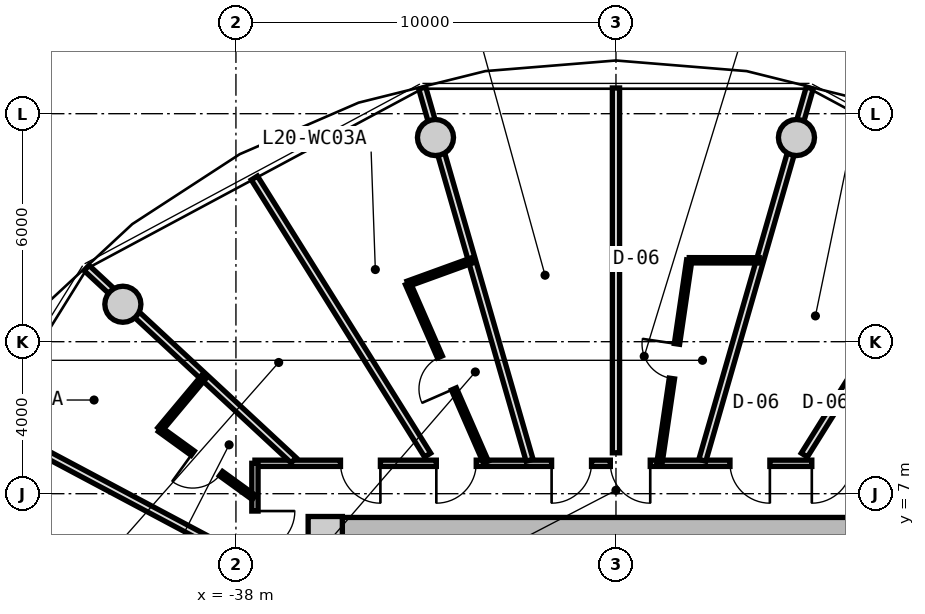
"""IFC4 building model, lengths in metres.
Left out: names, types, materials, properties, quantities, classifications, styles, units other than length and angle.
Written with IfcOpenShell. Run it as: python <this file> out.ifc"""

import sys

from ifc_helpers import new_model, si_unit, direction, frame, frame_2d, origin, origin_2d, place, context, subcontext, project, spatial, rectangle, circle, extrude, source, transform, mapped, element, fill, save


model = new_model("IFC4")
c1 = context("Model", 3, precision=1e-05, world=origin(), true_north=direction((0.0, 1.0)))
c2 = subcontext(c1, "Body", "Model", "MODEL_VIEW")
j1 = project(units=[si_unit("LENGTHUNIT", "METRE"), si_unit("PLANEANGLEUNIT", "RADIAN")], contexts=[c1])
p1 = place(None, origin())
s1 = spatial("IfcSite", under=j1, at=p1, CompositionType="ELEMENT")
p2 = place(p1, origin())
s2 = spatial("IfcBuilding", under=s1, at=p2, CompositionType="ELEMENT")
p3 = place(p2, frame((0.0, 0.0, 67.35)))
s3 = spatial("IfcBuildingStorey", under=s2, at=p3, CompositionType="ELEMENT", Elevation=67.35)
m1 = source(origin(), c2, "Body", "SweptSolid", [
    extrude(rectangle(XDim=0.9, YDim=0.9, at=origin_2d()), origin(), (0.0, 0.0, 1.0), 3.05),
])
p4 = place(p3, frame((-35.65, 5.95, 0.0), z_axis=(0.0, 0.0, 1.0), x_axis=(1.0, 0.0, 0.0)))
e1 = element("IfcColumn", 1, at=p4, inside=s3, PredefinedType="COLUMN", context=c2, shape_type="MappedRepresentation", body=[
    mapped(m1, transform((0.0, 0.0, 0.0), x_axis=(1.0, 0.0, 0.0), y_axis=(0.0, 1.0, 0.0), z_axis=(0.0, 0.0, 1.0), scale=1.0)),
])
m2 = source(origin(), c2, "Body", "SweptSolid", [
    extrude(rectangle(XDim=14.4, YDim=0.85, at=frame_2d((7.2, 0.0))), origin(), (0.0, 0.0, 1.0), 2.79),
])
p5 = place(p3, frame((-35.2, 5.95, 0.0), z_axis=(0.0, 0.0, 1.0), x_axis=(1.0, 0.0, 0.0)))
e2 = element("IfcWall", 2, at=p5, inside=s3, PredefinedType="SHEAR", context=c2, shape_type="MappedRepresentation", body=[
    mapped(m2, transform((0.0, 0.0, 0.0), x_axis=(1.0, 0.0, 0.0), y_axis=(0.0, 1.0, 0.0), z_axis=(0.0, 0.0, 1.0), scale=1.0)),
])
m3 = source(origin(), c2, "Body", "SweptSolid", [
    extrude(circle(Radius=0.475, at=origin_2d()), origin(), (0.0, 0.0, 1.0), 3.05),
])
for number, where, z_axis, x_axis in (
    (3, (-23.251, 16.373, 0.0), (0.0, 0.0, 1.0), (1.0, 0.0, 0.0)),
    (4, (-32.749, 16.373, 0.0), (0.0, 0.0, 1.0), (1.0, 0.0, 0.0)),
    (5, (-40.975, 11.985, 0.0), (0.0, 0.0, 1.0), (1.0, 0.0, 0.0)),
):
    element("IfcColumn", number, at=place(p3, frame(where, z_axis=z_axis, x_axis=x_axis)), inside=s3, PredefinedType="COLUMN", context=c2, shape_type="MappedRepresentation", body=[
        mapped(m3, transform((0.0, 0.0, 0.0), x_axis=(1.0, 0.0, 0.0), y_axis=(0.0, 1.0, 0.0), z_axis=(0.0, 0.0, 1.0), scale=1.0)),
    ])
m4 = source(origin(), c2, "Body", "SweptSolid", [
    extrude(rectangle(XDim=19.0, YDim=0.165, at=frame_2d((9.5, 0.0))), origin(), (0.0, 0.0, 1.0), 2.775),
])
p6 = place(p3, frame((-37.5, 7.8, 0.0), z_axis=(0.0, 0.0, 1.0), x_axis=(1.0, 0.0, 0.0)))
e6 = element("IfcWall", 6, at=p6, inside=s3, PredefinedType="PARTITIONING", context=c2, shape_type="MappedRepresentation", body=[
    mapped(m4, transform((0.0, 0.0, 0.0), x_axis=(1.0, 0.0, 0.0), y_axis=(0.0, 1.0, 0.0), z_axis=(0.0, 0.0, 1.0), scale=1.0)),
])
p7 = place(p6, frame((14.653, 0.0, 0.0)))
e7 = element("IfcOpeningElement", 7, at=p7, cuts=e6, PredefinedType="OPENING", context=c2, shape_type="SweptSolid", body=[
    extrude(rectangle(XDim=1.05, YDim=2.15, at=frame_2d((0.525, 1.075))), frame((0.0, 0.093, 0.0), z_axis=(0.0, -1.0, 0.0), x_axis=(1.0, 0.0, 0.0)), (0.0, 0.0, 1.0), 0.185),
])
p8 = place(p6, frame((12.5, 0.0, 0.0)))
e8 = element("IfcOpeningElement", 8, at=p8, cuts=e6, PredefinedType="OPENING", context=c2, shape_type="SweptSolid", body=[
    extrude(rectangle(XDim=1.05, YDim=2.15, at=frame_2d((0.525, 1.075))), frame((0.0, 0.093, 0.0), z_axis=(0.0, -1.0, 0.0), x_axis=(1.0, 0.0, 0.0)), (0.0, 0.0, 1.0), 0.185),
])
p9 = place(p6, frame((9.352, 0.0, 0.0)))
e9 = element("IfcOpeningElement", 9, at=p9, cuts=e6, PredefinedType="OPENING", context=c2, shape_type="SweptSolid", body=[
    extrude(rectangle(XDim=1.05, YDim=2.15, at=frame_2d((0.525, 1.075))), frame((0.0, 0.093, 0.0), z_axis=(0.0, -1.0, 0.0), x_axis=(1.0, 0.0, 0.0)), (0.0, 0.0, 1.0), 0.185),
])
p10 = place(p6, frame((7.806, 0.0, 0.0)))
e10 = element("IfcOpeningElement", 10, at=p10, cuts=e6, PredefinedType="OPENING", context=c2, shape_type="SweptSolid", body=[
    extrude(rectangle(XDim=1.05, YDim=2.15, at=frame_2d((0.525, 1.075))), frame((0.0, 0.093, 0.0), z_axis=(0.0, -1.0, 0.0), x_axis=(1.0, 0.0, 0.0)), (0.0, 0.0, 1.0), 0.185),
])
p11 = place(p6, frame((4.773, 0.0, 0.0)))
e11 = element("IfcOpeningElement", 11, at=p11, cuts=e6, PredefinedType="OPENING", context=c2, shape_type="SweptSolid", body=[
    extrude(rectangle(XDim=1.05, YDim=2.15, at=frame_2d((0.525, 1.075))), frame((0.0, 0.093, 0.0), z_axis=(0.0, -1.0, 0.0), x_axis=(1.0, 0.0, 0.0)), (0.0, 0.0, 1.0), 0.185),
])
p12 = place(p6, frame((2.251, 0.0, 0.0)))
e12 = element("IfcOpeningElement", 12, at=p12, cuts=e6, PredefinedType="OPENING", context=c2, shape_type="SweptSolid", body=[
    extrude(rectangle(XDim=1.05, YDim=2.15, at=frame_2d((0.525, 1.075))), frame((0.0, 0.093, 0.0), z_axis=(0.0, -1.0, 0.0), x_axis=(1.0, 0.0, 0.0)), (0.0, 0.0, 1.0), 0.185),
])
m5 = source(origin(), c2, "Body", "SweptSolid", [
    extrude(rectangle(XDim=15.6, YDim=0.165, at=frame_2d((7.8, 0.0))), origin(), (0.0, 0.0, 1.0), 2.775),
])
p13 = place(p3, frame((-37.5, -7.8, 0.0), z_axis=(0.0, 0.0, 1.0), x_axis=(0.0, 1.0, 0.0)))
e13 = element("IfcWall", 13, at=p13, inside=s3, PredefinedType="PARTITIONING", context=c2, shape_type="MappedRepresentation", body=[
    mapped(m5, transform((0.0, 0.0, 0.0), x_axis=(1.0, 0.0, 0.0), y_axis=(0.0, 1.0, 0.0), z_axis=(0.0, 0.0, 1.0), scale=1.0)),
])
p14 = place(p13, frame((3.489, 0.0, 0.0)))
e14 = element("IfcOpeningElement", 14, at=p14, cuts=e13, PredefinedType="OPENING", context=c2, shape_type="SweptSolid", body=[
    extrude(rectangle(XDim=1.05, YDim=2.15, at=frame_2d((0.525, 1.075))), frame((0.0, 0.093, 0.0), z_axis=(0.0, -1.0, 0.0), x_axis=(1.0, 0.0, 0.0)), (0.0, 0.0, 1.0), 0.185),
])
p15 = place(p13, frame((0.882, 0.0, 0.0)))
e15 = element("IfcOpeningElement", 15, at=p15, cuts=e13, PredefinedType="OPENING", context=c2, shape_type="SweptSolid", body=[
    extrude(rectangle(XDim=1.05, YDim=2.15, at=frame_2d((0.525, 1.075))), frame((0.0, 0.093, 0.0), z_axis=(0.0, -1.0, 0.0), x_axis=(1.0, 0.0, 0.0)), (0.0, 0.0, 1.0), 0.185),
])
p16 = place(p13, frame((13.293, 0.0, 0.0)))
e16 = element("IfcOpeningElement", 16, at=p16, cuts=e13, PredefinedType="OPENING", context=c2, shape_type="SweptSolid", body=[
    extrude(rectangle(XDim=1.05, YDim=2.15, at=frame_2d((0.525, 1.075))), frame((0.0, 0.093, 0.0), z_axis=(0.0, -1.0, 0.0), x_axis=(1.0, 0.0, 0.0)), (0.0, 0.0, 1.0), 0.185),
])
p17 = place(p13, frame((11.018, 0.0, 0.0)))
e17 = element("IfcOpeningElement", 17, at=p17, cuts=e13, PredefinedType="OPENING", context=c2, shape_type="SweptSolid", body=[
    extrude(rectangle(XDim=1.05, YDim=2.15, at=frame_2d((0.525, 1.075))), frame((0.0, 0.093, 0.0), z_axis=(0.0, -1.0, 0.0), x_axis=(1.0, 0.0, 0.0)), (0.0, 0.0, 1.0), 0.185),
])
p18 = place(p13, frame((8.467, 0.0, 0.0)))
e18 = element("IfcOpeningElement", 18, at=p18, cuts=e13, PredefinedType="OPENING", context=c2, shape_type="SweptSolid", body=[
    extrude(rectangle(XDim=1.05, YDim=2.15, at=frame_2d((0.525, 1.075))), frame((0.0, 0.093, 0.0), z_axis=(0.0, -1.0, 0.0), x_axis=(1.0, 0.0, 0.0)), (0.0, 0.0, 1.0), 0.185),
])
p19 = place(p13, frame((6.035, 0.0, 0.0)))
e19 = element("IfcOpeningElement", 19, at=p19, cuts=e13, PredefinedType="OPENING", context=c2, shape_type="SweptSolid", body=[
    extrude(rectangle(XDim=1.05, YDim=2.15, at=frame_2d((0.525, 1.075))), frame((0.0, 0.093, 0.0), z_axis=(0.0, -1.0, 0.0), x_axis=(1.0, 0.0, 0.0)), (0.0, 0.0, 1.0), 0.185),
])
m6 = source(origin(), c2, "Body", "SweptSolid", [
    extrude(rectangle(XDim=10.196, YDim=0.19, at=frame_2d((5.098, 0.0))), origin(), (0.0, 0.0, 1.0), 2.225),
])
p20 = place(p3, frame((-25.727, 7.88, 0.0), z_axis=(0.0, 0.0, 1.0), x_axis=(0.277136420347, 0.960830580549, 0.0)))
e20 = element("IfcWall", 20, at=p20, inside=s3, PredefinedType="PARTITIONING", context=c2, shape_type="MappedRepresentation", body=[
    mapped(m6, transform((0.0, 0.0, 0.0), x_axis=(1.0, 0.0, 0.0), y_axis=(0.0, 1.0, 0.0), z_axis=(0.0, 0.0, 1.0), scale=1.0)),
])
m7 = source(origin(), c2, "Body", "SweptSolid", [
    extrude(rectangle(XDim=8.598, YDim=0.19, at=frame_2d((4.299, 0.0))), origin(), (0.0, 0.0, 1.0), 2.775),
])
p21 = place(p3, frame((-23.043, 8.017, 0.0), z_axis=(0.0, 0.0, 1.0), x_axis=(0.530039776395, 0.847972779893, 0.0)))
e21 = element("IfcWall", 21, at=p21, inside=s3, PredefinedType="PARTITIONING", context=c2, shape_type="MappedRepresentation", body=[
    mapped(m7, transform((0.0, 0.0, 0.0), x_axis=(1.0, 0.0, 0.0), y_axis=(0.0, 1.0, 0.0), z_axis=(0.0, 0.0, 1.0), scale=1.0)),
])
p22 = place(p3, frame((-30.273, 7.88, 0.0), z_axis=(0.0, 0.0, 1.0), x_axis=(-0.277136420347, 0.960830580549, 0.0)))
e22 = element("IfcWall", 22, at=p22, inside=s3, PredefinedType="PARTITIONING", context=c2, shape_type="MappedRepresentation", body=[
    mapped(m6, transform((0.0, 0.0, 0.0), x_axis=(1.0, 0.0, 0.0), y_axis=(0.0, 1.0, 0.0), z_axis=(0.0, 0.0, 1.0), scale=1.0)),
])
m8 = source(origin(), c2, "Body", "SweptSolid", [
    extrude(rectangle(XDim=9.601, YDim=0.19, at=frame_2d((4.8, 0.0))), origin(), (0.0, 0.0, 1.0), 2.775),
])
p23 = place(p3, frame((-28.0, 8.076, 0.0), z_axis=(0.0, 0.0, 1.0), x_axis=(0.0, 1.0, 0.0)))
e23 = element("IfcWall", 23, at=p23, inside=s3, PredefinedType="PARTITIONING", context=c2, shape_type="MappedRepresentation", body=[
    mapped(m8, transform((0.0, 0.0, 0.0), x_axis=(1.0, 0.0, 0.0), y_axis=(0.0, 1.0, 0.0), z_axis=(0.0, 0.0, 1.0), scale=1.0)),
])
m9 = source(origin(), c2, "Body", "SweptSolid", [
    extrude(rectangle(XDim=5.37, YDim=0.14, at=frame_2d((2.685, 0.0))), origin(), (0.0, 0.0, 1.0), 2.775),
])
p24 = place(p3, frame((-26.851, 7.83, 0.0), z_axis=(0.0, 0.0, 1.0), x_axis=(0.145131397853, 0.989412389935, 0.0)))
e24 = element("IfcWall", 24, at=p24, inside=s3, PredefinedType="PARTITIONING", context=c2, shape_type="MappedRepresentation", body=[
    mapped(m9, transform((0.0, 0.0, 0.0), x_axis=(1.0, 0.0, 0.0), y_axis=(0.0, 1.0, 0.0), z_axis=(0.0, 0.0, 1.0), scale=1.0)),
])
p25 = place(p24, frame((2.225, 0.0, 0.0)))
e25 = element("IfcOpeningElement", 25, at=p25, cuts=e24, PredefinedType="OPENING", context=c2, shape_type="SweptSolid", body=[
    extrude(rectangle(XDim=0.92, YDim=2.1, at=frame_2d((0.46, 1.05))), frame((0.0, 0.08, 0.0), z_axis=(0.0, -1.0, 0.0), x_axis=(1.0, 0.0, 0.0)), (0.0, 0.0, 1.0), 0.16),
])
m10 = source(origin(), c2, "Body", "SweptSolid", [
    extrude(rectangle(XDim=1.843, YDim=0.14, at=frame_2d((0.921, 0.0))), origin(), (0.0, 0.0, 1.0), 2.775),
])
p26 = place(p3, frame((-26.072, 13.143, 0.0), z_axis=(0.0, 0.0, 1.0), x_axis=(0.999998937801, -0.001457531246, 0.0)))
e26 = element("IfcWall", 26, at=p26, inside=s3, PredefinedType="PARTITIONING", context=c2, shape_type="MappedRepresentation", body=[
    mapped(m10, transform((0.0, 0.0, 0.0), x_axis=(1.0, 0.0, 0.0), y_axis=(0.0, 1.0, 0.0), z_axis=(0.0, 0.0, 1.0), scale=1.0)),
])
m11 = source(origin(), c2, "Body", "SweptSolid", [
    extrude(rectangle(XDim=7.435, YDim=0.19, at=frame_2d((3.717, 0.0))), origin(), (0.0, 0.0, 1.0), 2.225),
])
p27 = place(p3, frame((-36.483, 7.88, 0.0), z_axis=(0.0, 0.0, 1.0), x_axis=(-0.732651956848, 0.680603489652, 0.0)))
e27 = element("IfcWall", 27, at=p27, inside=s3, PredefinedType="PARTITIONING", context=c2, shape_type="MappedRepresentation", body=[
    mapped(m11, transform((0.0, 0.0, 0.0), x_axis=(1.0, 0.0, 0.0), y_axis=(0.0, 1.0, 0.0), z_axis=(0.0, 0.0, 1.0), scale=1.0)),
])
p28 = place(p3, frame((-32.957, 8.017, 0.0), z_axis=(0.0, 0.0, 1.0), x_axis=(-0.530039776395, 0.847972779893, 0.0)))
e28 = element("IfcWall", 28, at=p28, inside=s3, PredefinedType="PARTITIONING", context=c2, shape_type="MappedRepresentation", body=[
    mapped(m7, transform((0.0, 0.0, 0.0), x_axis=(1.0, 0.0, 0.0), y_axis=(0.0, 1.0, 0.0), z_axis=(0.0, 0.0, 1.0), scale=1.0)),
])
m12 = source(origin(), c2, "Body", "SweptSolid", [
    extrude(rectangle(XDim=5.126, YDim=0.14, at=frame_2d((2.563, 0.0))), origin(), (0.0, 0.0, 1.0), 2.775),
])
p29 = place(p3, frame((-31.422, 7.83, 0.0), z_axis=(0.0, 0.0, 1.0), x_axis=(-0.400473994842, 0.916308124735, 0.0)))
e29 = element("IfcWall", 29, at=p29, inside=s3, PredefinedType="PARTITIONING", context=c2, shape_type="MappedRepresentation", body=[
    mapped(m12, transform((0.0, 0.0, 0.0), x_axis=(1.0, 0.0, 0.0), y_axis=(0.0, 1.0, 0.0), z_axis=(0.0, 0.0, 1.0), scale=1.0)),
])
p30 = place(p29, frame((2.103, 0.0, 0.0)))
e30 = element("IfcOpeningElement", 30, at=p30, cuts=e29, PredefinedType="OPENING", context=c2, shape_type="SweptSolid", body=[
    extrude(rectangle(XDim=0.92, YDim=2.1, at=frame_2d((0.46, 1.05))), frame((0.0, 0.08, 0.0), z_axis=(0.0, -1.0, 0.0), x_axis=(1.0, 0.0, 0.0)), (0.0, 0.0, 1.0), 0.16),
])
m13 = source(origin(), c2, "Body", "SweptSolid", [
    extrude(rectangle(XDim=1.811, YDim=0.14, at=frame_2d((0.906, 0.0))), origin(), (0.0, 0.0, 1.0), 2.775),
])
p31 = place(p3, frame((-33.475, 12.527, 0.0), z_axis=(0.0, 0.0, 1.0), x_axis=(0.940009682452, 0.341147764021, 0.0)))
e31 = element("IfcWall", 31, at=p31, inside=s3, PredefinedType="PARTITIONING", context=c2, shape_type="MappedRepresentation", body=[
    mapped(m13, transform((0.0, 0.0, 0.0), x_axis=(1.0, 0.0, 0.0), y_axis=(0.0, 1.0, 0.0), z_axis=(0.0, 0.0, 1.0), scale=1.0)),
])
m14 = source(origin(), c2, "Body", "SweptSolid", [
    extrude(rectangle(XDim=7.677, YDim=0.19, at=frame_2d((3.838, 0.0))), origin(), (0.0, 0.0, 1.0), 2.775),
])
p32 = place(p3, frame((-37.703, 5.231, 0.0), z_axis=(0.0, 0.0, 1.0), x_axis=(-0.882725057546, 0.469889851753, 0.0)))
e32 = element("IfcWall", 32, at=p32, inside=s3, PredefinedType="PARTITIONING", context=c2, shape_type="MappedRepresentation", body=[
    mapped(m14, transform((0.0, 0.0, 0.0), x_axis=(1.0, 0.0, 0.0), y_axis=(0.0, 1.0, 0.0), z_axis=(0.0, 0.0, 1.0), scale=1.0)),
])
m15 = source(origin(), c2, "Body", "SweptSolid", [
    extrude(rectangle(XDim=3.051, YDim=0.14, at=frame_2d((1.525, 0.0))), origin(), (0.0, 0.0, 1.0), 2.775),
])
p33 = place(p3, frame((-37.53, 6.903, 0.0), z_axis=(0.0, 0.0, 1.0), x_axis=(-0.809849031404, 0.586638343729, 0.0)))
e33 = element("IfcWall", 33, at=p33, inside=s3, PredefinedType="PARTITIONING", context=c2, shape_type="MappedRepresentation", body=[
    mapped(m15, transform((0.0, 0.0, 0.0), x_axis=(1.0, 0.0, 0.0), y_axis=(0.0, 1.0, 0.0), z_axis=(0.0, 0.0, 1.0), scale=1.0)),
])
p34 = place(p33, frame((1.065, 0.0, 0.0)))
e34 = element("IfcOpeningElement", 34, at=p34, cuts=e33, PredefinedType="OPENING", context=c2, shape_type="SweptSolid", body=[
    extrude(rectangle(XDim=0.92, YDim=2.1, at=frame_2d((0.46, 1.05))), frame((0.0, 0.08, 0.0), z_axis=(0.0, -1.0, 0.0), x_axis=(1.0, 0.0, 0.0)), (0.0, 0.0, 1.0), 0.16),
])
m16 = source(origin(), c2, "Body", "SweptSolid", [
    extrude(rectangle(XDim=1.84, YDim=0.14, at=frame_2d((0.92, 0.0))), origin(), (0.0, 0.0, 1.0), 2.415),
])
p35 = place(p3, frame((-40.0, 8.692, 0.0), z_axis=(0.0, 0.0, 1.0), x_axis=(0.641410397049, 0.767197955262, 0.0)))
e35 = element("IfcWall", 35, at=p35, inside=s3, PredefinedType="PARTITIONING", context=c2, shape_type="MappedRepresentation", body=[
    mapped(m16, transform((0.0, 0.0, 0.0), x_axis=(1.0, 0.0, 0.0), y_axis=(0.0, 1.0, 0.0), z_axis=(0.0, 0.0, 1.0), scale=1.0)),
])
m17 = source(origin(), c2, "Body", "SweptSolid", [
    extrude(rectangle(XDim=1.05, YDim=2.15, at=frame_2d((0.525, 1.075))), frame((0.0, 0.025, 0.0), z_axis=(0.0, -1.0, 0.0), x_axis=(1.0, 0.0, 0.0)), (0.0, 0.0, 1.0), 0.05),
])
p36 = place(p7, frame((1.05, 0.0, 0.0), z_axis=(0.0, 0.0, 1.0), x_axis=(-1.0, 0.0, 0.0)))
e36 = element("IfcDoor", 36, at=p36, inside=s3, OperationType="SINGLE_SWING_RIGHT", PredefinedType="DOOR", context=c2, shape_type="MappedRepresentation", body=[
    mapped(m17, transform((0.0, 0.0, 0.0), x_axis=(1.0, 0.0, 0.0), y_axis=(0.0, 1.0, 0.0), z_axis=(0.0, 0.0, 1.0), scale=1.0)),
])
fill(e7, e36)
p37 = place(p8, frame((1.05, 0.0, 0.0), z_axis=(0.0, 0.0, 1.0), x_axis=(-1.0, 0.0, 0.0)))
e37 = element("IfcDoor", 37, at=p37, inside=s3, OperationType="SINGLE_SWING_LEFT", PredefinedType="DOOR", context=c2, shape_type="MappedRepresentation", body=[
    mapped(m17, transform((0.0, 0.0, 0.0), x_axis=(1.0, 0.0, 0.0), y_axis=(0.0, 1.0, 0.0), z_axis=(0.0, 0.0, 1.0), scale=1.0)),
])
fill(e8, e37)
p38 = place(p9, frame((1.05, 0.0, 0.0), z_axis=(0.0, 0.0, 1.0), x_axis=(-1.0, 0.0, 0.0)))
e38 = element("IfcDoor", 38, at=p38, inside=s3, OperationType="SINGLE_SWING_LEFT", PredefinedType="DOOR", context=c2, shape_type="MappedRepresentation", body=[
    mapped(m17, transform((0.0, 0.0, 0.0), x_axis=(1.0, 0.0, 0.0), y_axis=(0.0, 1.0, 0.0), z_axis=(0.0, 0.0, 1.0), scale=1.0)),
])
fill(e9, e38)
m18 = source(origin(), c2, "Body", "SweptSolid", [
    extrude(rectangle(XDim=0.92, YDim=2.1, at=frame_2d((0.46, 1.05))), frame((0.0, 0.025, 0.0), z_axis=(0.0, -1.0, 0.0), x_axis=(1.0, 0.0, 0.0)), (0.0, 0.0, 1.0), 0.05),
])
p39 = place(p25, origin())
e39 = element("IfcDoor", 39, at=p39, inside=s3, OperationType="SINGLE_SWING_RIGHT", PredefinedType="DOOR", context=c2, shape_type="MappedRepresentation", body=[
    mapped(m18, transform((0.0, 0.0, 0.0), x_axis=(1.0, 0.0, 0.0), y_axis=(0.0, 1.0, 0.0), z_axis=(0.0, 0.0, 1.0), scale=1.0)),
])
fill(e25, e39)
p40 = place(p10, frame((1.05, 0.0, 0.0), z_axis=(0.0, 0.0, 1.0), x_axis=(-1.0, 0.0, 0.0)))
e40 = element("IfcDoor", 40, at=p40, inside=s3, OperationType="SINGLE_SWING_RIGHT", PredefinedType="DOOR", context=c2, shape_type="MappedRepresentation", body=[
    mapped(m17, transform((0.0, 0.0, 0.0), x_axis=(1.0, 0.0, 0.0), y_axis=(0.0, 1.0, 0.0), z_axis=(0.0, 0.0, 1.0), scale=1.0)),
])
fill(e10, e40)
p41 = place(p11, frame((1.05, 0.0, 0.0), z_axis=(0.0, 0.0, 1.0), x_axis=(-1.0, 0.0, 0.0)))
e41 = element("IfcDoor", 41, at=p41, inside=s3, OperationType="SINGLE_SWING_RIGHT", PredefinedType="DOOR", context=c2, shape_type="MappedRepresentation", body=[
    mapped(m17, transform((0.0, 0.0, 0.0), x_axis=(1.0, 0.0, 0.0), y_axis=(0.0, 1.0, 0.0), z_axis=(0.0, 0.0, 1.0), scale=1.0)),
])
fill(e11, e41)
p42 = place(p30, origin())
e42 = element("IfcDoor", 42, at=p42, inside=s3, OperationType="SINGLE_SWING_LEFT", PredefinedType="DOOR", context=c2, shape_type="MappedRepresentation", body=[
    mapped(m18, transform((0.0, 0.0, 0.0), x_axis=(1.0, 0.0, 0.0), y_axis=(0.0, 1.0, 0.0), z_axis=(0.0, 0.0, 1.0), scale=1.0)),
])
fill(e30, e42)
p43 = place(p12, frame((1.05, 0.0, 0.0), z_axis=(0.0, 0.0, 1.0), x_axis=(-1.0, 0.0, 0.0)))
e43 = element("IfcDoor", 43, at=p43, inside=s3, OperationType="SINGLE_SWING_LEFT", PredefinedType="DOOR", context=c2, shape_type="MappedRepresentation", body=[
    mapped(m17, transform((0.0, 0.0, 0.0), x_axis=(1.0, 0.0, 0.0), y_axis=(0.0, 1.0, 0.0), z_axis=(0.0, 0.0, 1.0), scale=1.0)),
])
fill(e12, e43)
p44 = place(p16, frame((1.05, 0.0, 0.0), z_axis=(0.0, 0.0, 1.0), x_axis=(-1.0, 0.0, 0.0)))
e44 = element("IfcDoor", 44, at=p44, inside=s3, OperationType="SINGLE_SWING_LEFT", PredefinedType="DOOR", context=c2, shape_type="MappedRepresentation", body=[
    mapped(m17, transform((0.0, 0.0, 0.0), x_axis=(1.0, 0.0, 0.0), y_axis=(0.0, 1.0, 0.0), z_axis=(0.0, 0.0, 1.0), scale=1.0)),
])
fill(e16, e44)
p45 = place(p34, origin())
e45 = element("IfcDoor", 45, at=p45, inside=s3, OperationType="SINGLE_SWING_RIGHT", PredefinedType="DOOR", context=c2, shape_type="MappedRepresentation", body=[
    mapped(m18, transform((0.0, 0.0, 0.0), x_axis=(1.0, 0.0, 0.0), y_axis=(0.0, 1.0, 0.0), z_axis=(0.0, 0.0, 1.0), scale=1.0)),
])
fill(e34, e45)
save(model, sys.argv[1])
